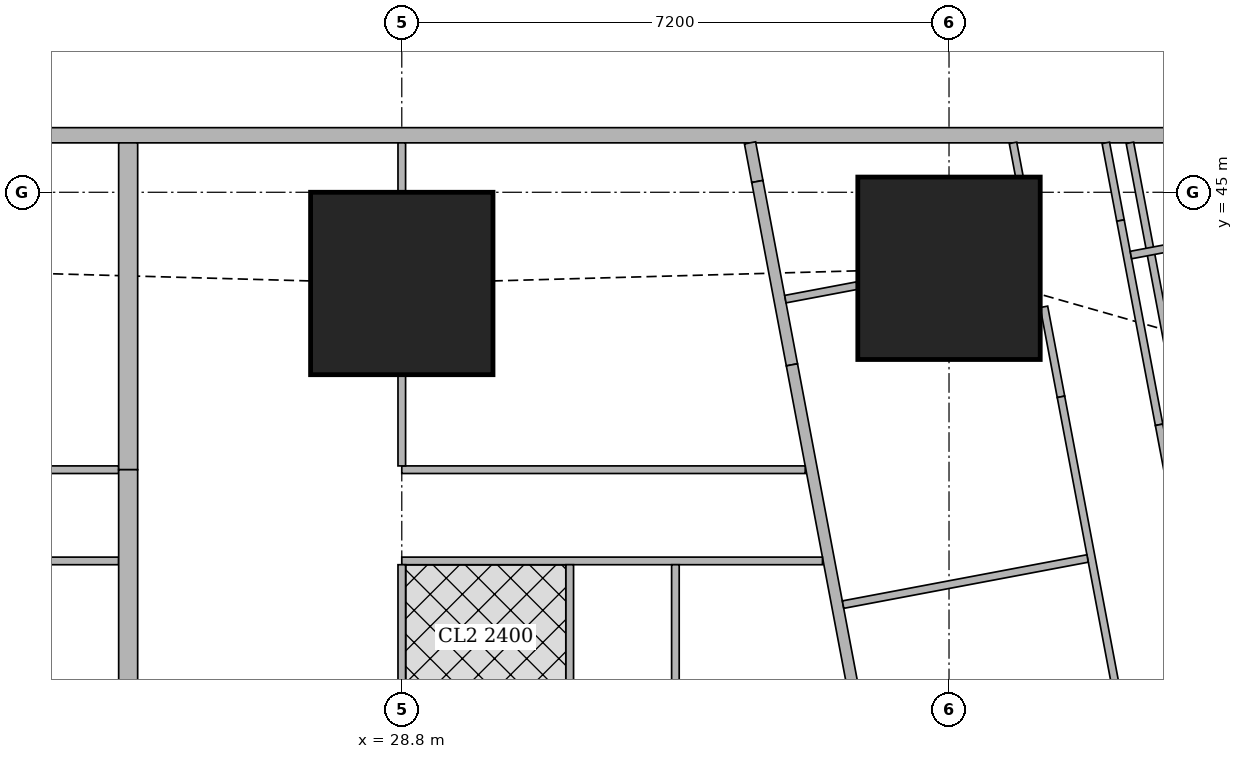
"""IFC4 building model, lengths in metres.
Left out: names, types, materials, properties, quantities, classifications, styles, units other than length and angle.
Written with IfcOpenShell. Run it as: python <this file> out.ifc"""

import sys

from ifc_helpers import new_model, si_unit, direction, frame, frame_2d, origin, origin_2d, place, context, subcontext, project, spatial, rectangle, extrude, element, fill, save


model = new_model("IFC4")
c1 = context("Model", 3, precision=1e-05, world=origin(), true_north=direction((0.0, 1.0)))
c2 = subcontext(c1, "Body", "Model", "MODEL_VIEW")
j1 = project(units=[si_unit("LENGTHUNIT", "METRE"), si_unit("PLANEANGLEUNIT", "RADIAN")], contexts=[c1])
p1 = place(None, origin())
s1 = spatial("IfcSite", under=j1, at=p1, CompositionType="ELEMENT")
p2 = place(p1, origin())
s2 = spatial("IfcBuilding", under=s1, at=p2, CompositionType="ELEMENT")
p3 = place(p2, frame((0.0, 0.0, 216.2)))
s3 = spatial("IfcBuildingStorey", under=s2, at=p3, CompositionType="ELEMENT", Elevation=216.2)
for number, where, z_axis, x_axis in (
    (1, (28.8, 43.8, 0.0), (0.0, 0.0, 1.0), (1.0, 0.0, 0.0)),
    (2, (36.0, 44.0, 0.0), (0.0, 0.0, 1.0), (1.0, 0.0, 0.0)),
):
    element("IfcColumn", number, at=place(p3, frame(where, z_axis=z_axis, x_axis=x_axis)), inside=s3, PredefinedType="COLUMN", context=c2, shape_type="SweptSolid", body=[
        extrude(rectangle(XDim=2.4, YDim=2.4, at=origin_2d()), origin(), (0.0, 0.0, 1.0), 3.75),
    ])
p4 = place(p3, frame((40.106, 45.75, 0.0), z_axis=(0.0, 0.0, 1.0), x_axis=(-1.0, 0.0, 0.0)))
e3 = element("IfcWall", 3, at=p4, inside=s3, PredefinedType="SOLIDWALL", context=c2, shape_type="SweptSolid", body=[
    extrude(rectangle(XDim=32.743, YDim=0.2, at=frame_2d((16.372, 0.0))), origin(), (0.0, 0.0, 1.0), 3.5),
])
p5 = place(p4, frame((8.606, 0.0, 0.9)))
e4 = element("IfcOpeningElement", 4, at=p5, cuts=e3, PredefinedType="OPENING", context=c2, shape_type="SweptSolid", body=[
    extrude(rectangle(XDim=1.8, YDim=1.5, at=frame_2d((0.9, 0.75))), frame((0.0, 0.11, 0.0), z_axis=(0.0, -1.0, 0.0), x_axis=(1.0, 0.0, 0.0)), (0.0, 0.0, 1.0), 0.22),
])
p6 = place(p4, frame((12.206, 0.0, 0.9)))
e5 = element("IfcOpeningElement", 5, at=p6, cuts=e3, PredefinedType="OPENING", context=c2, shape_type="SweptSolid", body=[
    extrude(rectangle(XDim=1.8, YDim=1.5, at=frame_2d((0.9, 0.75))), frame((0.0, 0.11, 0.0), z_axis=(0.0, -1.0, 0.0), x_axis=(1.0, 0.0, 0.0)), (0.0, 0.0, 1.0), 0.22),
])
p7 = place(p4, frame((15.806, 0.0, 0.9)))
e6 = element("IfcOpeningElement", 6, at=p7, cuts=e3, PredefinedType="OPENING", context=c2, shape_type="SweptSolid", body=[
    extrude(rectangle(XDim=1.8, YDim=1.5, at=frame_2d((0.9, 0.75))), frame((0.0, 0.11, 0.0), z_axis=(0.0, -1.0, 0.0), x_axis=(1.0, 0.0, 0.0)), (0.0, 0.0, 1.0), 0.22),
])
p8 = place(p4, frame((19.406, 0.0, 0.9)))
e7 = element("IfcOpeningElement", 7, at=p8, cuts=e3, PredefinedType="OPENING", context=c2, shape_type="SweptSolid", body=[
    extrude(rectangle(XDim=1.8, YDim=1.5, at=frame_2d((0.9, 0.75))), frame((0.0, 0.11, 0.0), z_axis=(0.0, -1.0, 0.0), x_axis=(1.0, 0.0, 0.0)), (0.0, 0.0, 1.0), 0.22),
])
p9 = place(p4, frame((23.006, 0.0, 0.9)))
e8 = element("IfcOpeningElement", 8, at=p9, cuts=e3, PredefinedType="OPENING", context=c2, shape_type="SweptSolid", body=[
    extrude(rectangle(XDim=1.8, YDim=1.5, at=frame_2d((0.9, 0.75))), frame((0.0, 0.11, 0.0), z_axis=(0.0, -1.0, 0.0), x_axis=(1.0, 0.0, 0.0)), (0.0, 0.0, 1.0), 0.22),
])
p10 = place(p4, frame((28.025, 0.0, 0.9)))
e9 = element("IfcOpeningElement", 9, at=p10, cuts=e3, PredefinedType="OPENING", context=c2, shape_type="SweptSolid", body=[
    extrude(rectangle(XDim=2.4, YDim=1.5, at=frame_2d((1.2, 0.75))), frame((0.0, 0.11, 0.0), z_axis=(0.0, -1.0, 0.0), x_axis=(1.0, 0.0, 0.0)), (0.0, 0.0, 1.0), 0.22),
])
p11 = place(p3, frame((33.382, 45.65, 0.0), z_axis=(0.0, 0.0, 1.0), x_axis=(0.185657456326, -0.982614527122, 0.0)))
e10 = element("IfcWall", 10, at=p11, inside=s3, PredefinedType="SOLIDWALL", context=c2, shape_type="SweptSolid", body=[
    extrude(rectangle(XDim=0.517, YDim=0.15, at=frame_2d((0.258, 0.0))), origin(), (0.0, 0.0, 1.0), 3.5),
])
p12 = place(p3, frame((33.478, 45.142, 0.0), z_axis=(0.0, 0.0, 1.0), x_axis=(0.185393362436, -0.982664388876, 0.0)))
e11 = element("IfcWall", 11, at=p12, inside=s3, PredefinedType="SOLIDWALL", context=c2, shape_type="SweptSolid", body=[
    extrude(rectangle(XDim=2.455, YDim=0.15, at=frame_2d((1.227, 0.0))), origin(), (0.0, 0.0, 1.0), 2.05),
])
p13 = place(p3, frame((33.933, 42.73, 0.0), z_axis=(0.0, 0.0, 1.0), x_axis=(0.185595417643, -0.982626246825, 0.0)))
e12 = element("IfcWall", 12, at=p13, inside=s3, PredefinedType="SOLIDWALL", context=c2, shape_type="SweptSolid", body=[
    extrude(rectangle(XDim=41.051, YDim=0.15, at=frame_2d((20.525, 0.0))), origin(), (0.0, 0.0, 1.0), 2.5),
])
p14 = place(p13, frame((12.266, 0.0, 0.0)))
e13 = element("IfcOpeningElement", 13, at=p14, cuts=e12, PredefinedType="OPENING", context=c2, shape_type="SweptSolid", body=[
    extrude(rectangle(XDim=1.0, YDim=2.1, at=frame_2d((0.5, 1.05))), frame((0.0, 0.085, 0.0), z_axis=(0.0, -1.0, 0.0), x_axis=(1.0, 0.0, 0.0)), (0.0, 0.0, 1.0), 0.17),
])
p15 = place(p13, frame((16.082, 0.0, 0.0)))
e14 = element("IfcOpeningElement", 14, at=p15, cuts=e12, PredefinedType="OPENING", context=c2, shape_type="SweptSolid", body=[
    extrude(rectangle(XDim=1.0, YDim=2.1, at=frame_2d((0.5, 1.05))), frame((0.0, 0.085, 0.0), z_axis=(0.0, -1.0, 0.0), x_axis=(1.0, 0.0, 0.0)), (0.0, 0.0, 1.0), 0.17),
])
p16 = place(p13, frame((24.369, 0.0, 0.0)))
e15 = element("IfcOpeningElement", 15, at=p16, cuts=e12, PredefinedType="OPENING", context=c2, shape_type="SweptSolid", body=[
    extrude(rectangle(XDim=1.0, YDim=2.1, at=frame_2d((0.5, 1.05))), frame((0.0, 0.085, 0.0), z_axis=(0.0, -1.0, 0.0), x_axis=(1.0, 0.0, 0.0)), (0.0, 0.0, 1.0), 0.17),
])
p17 = place(p13, frame((30.862, 0.0, 0.0)))
e16 = element("IfcOpeningElement", 16, at=p17, cuts=e12, PredefinedType="OPENING", context=c2, shape_type="SweptSolid", body=[
    extrude(rectangle(XDim=1.0, YDim=2.1, at=frame_2d((0.5, 1.05))), frame((0.0, 0.085, 0.0), z_axis=(0.0, -1.0, 0.0), x_axis=(1.0, 0.0, 0.0)), (0.0, 0.0, 1.0), 0.17),
])
p18 = place(p3, frame((39.054, 42.085, 0.0), z_axis=(0.0, 0.0, 1.0), x_axis=(-0.185791584218, 0.982589175207, 0.0)))
e17 = element("IfcWall", 17, at=p18, inside=s3, PredefinedType="PARTITIONING", context=c2, shape_type="SweptSolid", body=[
    extrude(rectangle(XDim=3.628, YDim=0.1, at=frame_2d((1.814, 0.0))), origin(), (0.0, 0.0, 1.0), 2.05),
])
p19 = place(p3, frame((38.063, 45.65, 0.0), z_axis=(0.0, 0.0, 1.0), x_axis=(0.185677287841, -0.982610779902, 0.0)))
e18 = element("IfcWall", 18, at=p19, inside=s3, PredefinedType="PARTITIONING", context=c2, shape_type="SweptSolid", body=[
    extrude(rectangle(XDim=1.04, YDim=0.1, at=frame_2d((0.52, 0.0))), origin(), (0.0, 0.0, 1.0), 3.5),
])
p20 = place(p3, frame((38.256, 44.628, 0.0), z_axis=(0.0, 0.0, 1.0), x_axis=(0.185700639943, -0.982606366927, 0.0)))
e19 = element("IfcWall", 19, at=p20, inside=s3, PredefinedType="PARTITIONING", context=c2, shape_type="SweptSolid", body=[
    extrude(rectangle(XDim=2.735, YDim=0.1, at=frame_2d((1.367, 0.0))), origin(), (0.0, 0.0, 1.0), 2.05),
])
p21 = place(p3, frame((38.764, 41.941, 0.0), z_axis=(0.0, 0.0, 1.0), x_axis=(0.185548572312, -0.982635093671, 0.0)))
e20 = element("IfcWall", 20, at=p21, inside=s3, PredefinedType="PARTITIONING", context=c2, shape_type="SweptSolid", body=[
    extrude(rectangle(XDim=9.135, YDim=0.1, at=frame_2d((4.568, 0.0))), origin(), (0.0, 0.0, 1.0), 3.5),
])
p22 = place(p21, frame((8.085, 0.0, 0.0)))
e21 = element("IfcOpeningElement", 21, at=p22, cuts=e20, PredefinedType="OPENING", context=c2, shape_type="SweptSolid", body=[
    extrude(rectangle(XDim=0.9, YDim=2.1, at=frame_2d((0.45, 1.05))), frame((0.0, 0.06, 0.0), z_axis=(0.0, -1.0, 0.0), x_axis=(1.0, 0.0, 0.0)), (0.0, 0.0, 1.0), 0.12),
])
p23 = place(p21, frame((3.7, 0.0, 0.0)))
e22 = element("IfcOpeningElement", 22, at=p23, cuts=e20, PredefinedType="OPENING", context=c2, shape_type="SweptSolid", body=[
    extrude(rectangle(XDim=0.9, YDim=2.1, at=frame_2d((0.45, 1.05))), frame((0.0, 0.06, 0.0), z_axis=(0.0, -1.0, 0.0), x_axis=(1.0, 0.0, 0.0)), (0.0, 0.0, 1.0), 0.12),
])
p24 = place(p3, frame((36.842, 45.65, 0.0), z_axis=(0.0, 0.0, 1.0), x_axis=(0.185407859198, -0.982661653748, 0.0)))
e23 = element("IfcWall", 23, at=p24, inside=s3, PredefinedType="PARTITIONING", context=c2, shape_type="SweptSolid", body=[
    extrude(rectangle(XDim=0.448, YDim=0.1, at=frame_2d((0.224, 0.0))), origin(), (0.0, 0.0, 1.0), 3.5),
])
p25 = place(p3, frame((37.249, 43.493, 0.0), z_axis=(0.0, 0.0, 1.0), x_axis=(0.185817643817, -0.982584247404, 0.0)))
e24 = element("IfcWall", 24, at=p25, inside=s3, PredefinedType="PARTITIONING", context=c2, shape_type="SweptSolid", body=[
    extrude(rectangle(XDim=1.205, YDim=0.1, at=frame_2d((0.603, 0.0))), origin(), (0.0, 0.0, 1.0), 2.05),
])
p26 = place(p3, frame((37.473, 42.309, 0.0), z_axis=(0.0, 0.0, 1.0), x_axis=(0.185491912953, -0.982645790827, 0.0)))
e25 = element("IfcWall", 25, at=p26, inside=s3, PredefinedType="PARTITIONING", context=c2, shape_type="SweptSolid", body=[
    extrude(rectangle(XDim=9.737, YDim=0.1, at=frame_2d((4.869, 0.0))), origin(), (0.0, 0.0, 1.0), 3.5),
])
p27 = place(p26, frame((8.232, 0.0, 0.0)))
e26 = element("IfcOpeningElement", 26, at=p27, cuts=e25, PredefinedType="OPENING", context=c2, shape_type="SweptSolid", body=[
    extrude(rectangle(XDim=0.9, YDim=2.1, at=frame_2d((0.45, 1.05))), frame((0.0, 0.06, 0.0), z_axis=(0.0, -1.0, 0.0), x_axis=(1.0, 0.0, 0.0)), (0.0, 0.0, 1.0), 0.12),
])
p28 = place(p26, frame((2.853, 0.0, 0.0)))
e27 = element("IfcOpeningElement", 27, at=p28, cuts=e25, PredefinedType="OPENING", context=c2, shape_type="SweptSolid", body=[
    extrude(rectangle(XDim=0.9, YDim=2.1, at=frame_2d((0.45, 1.05))), frame((0.0, 0.06, 0.0), z_axis=(0.0, -1.0, 0.0), x_axis=(1.0, 0.0, 0.0)), (0.0, 0.0, 1.0), 0.12),
])
p29 = place(p26, frame((5.564, 0.0, 0.0)))
e28 = element("IfcOpeningElement", 28, at=p29, cuts=e25, PredefinedType="OPENING", context=c2, shape_type="SweptSolid", body=[
    extrude(rectangle(XDim=0.9, YDim=2.1, at=frame_2d((0.45, 1.05))), frame((0.0, 0.06, 0.0), z_axis=(0.0, -1.0, 0.0), x_axis=(1.0, 0.0, 0.0)), (0.0, 0.0, 1.0), 0.12),
])
p30 = place(p3, frame((41.968, 44.85, 0.0), z_axis=(0.0, 0.0, 1.0), x_axis=(-0.98258614234, -0.185807623311, 0.0)))
e29 = element("IfcWall", 29, at=p30, inside=s3, PredefinedType="PARTITIONING", context=c2, shape_type="SweptSolid", body=[
    extrude(rectangle(XDim=3.638, YDim=0.1, at=frame_2d((1.819, 0.0))), origin(), (0.0, 0.0, 1.0), 2.05),
])
p31 = place(p3, frame((34.79, 43.772, 0.0), z_axis=(0.0, 0.0, 1.0), x_axis=(-0.982655532093, -0.185440301034, 0.0)))
e30 = element("IfcWall", 30, at=p31, inside=s3, PredefinedType="PARTITIONING", context=c2, shape_type="SweptSolid", body=[
    extrude(rectangle(XDim=0.96, YDim=0.1, at=frame_2d((0.48, 0.0))), origin(), (0.0, 0.0, 1.0), 2.05),
])
p32 = place(p3, frame((37.823, 40.182, 0.0), z_axis=(0.0, 0.0, 1.0), x_axis=(-0.982664729897, -0.18539155487, 0.0)))
e31 = element("IfcWall", 31, at=p32, inside=s3, PredefinedType="PARTITIONING", context=c2, shape_type="SweptSolid", body=[
    extrude(rectangle(XDim=3.274, YDim=0.1, at=frame_2d((1.637, 0.0))), origin(), (0.0, 0.0, 1.0), 3.5),
])
p33 = place(p3, frame((18.0, 41.35, 0.0), z_axis=(0.0, 0.0, 1.0), x_axis=(1.0, 0.0, 0.0)))
e32 = element("IfcWall", 32, at=p33, inside=s3, PredefinedType="PARTITIONING", context=c2, shape_type="SweptSolid", body=[
    extrude(rectangle(XDim=7.075, YDim=0.1, at=frame_2d((3.538, 0.0))), origin(), (0.0, 0.0, 1.0), 3.5),
])
p34 = place(p33, frame((0.2, 0.0, 0.0)))
e33 = element("IfcOpeningElement", 33, at=p34, cuts=e32, PredefinedType="OPENING", context=c2, shape_type="SweptSolid", body=[
    extrude(rectangle(XDim=0.9, YDim=2.1, at=frame_2d((0.45, 1.05))), frame((0.0, 0.06, 0.0), z_axis=(0.0, -1.0, 0.0), x_axis=(1.0, 0.0, 0.0)), (0.0, 0.0, 1.0), 0.12),
])
p35 = place(p33, frame((3.8, 0.0, 0.0)))
e34 = element("IfcOpeningElement", 34, at=p35, cuts=e32, PredefinedType="OPENING", context=c2, shape_type="SweptSolid", body=[
    extrude(rectangle(XDim=0.9, YDim=2.1, at=frame_2d((0.45, 1.05))), frame((0.0, 0.06, 0.0), z_axis=(0.0, -1.0, 0.0), x_axis=(1.0, 0.0, 0.0)), (0.0, 0.0, 1.0), 0.12),
])
p36 = place(p3, frame((18.0, 40.15, 0.0), z_axis=(0.0, 0.0, 1.0), x_axis=(1.0, 0.0, 0.0)))
e35 = element("IfcWall", 35, at=p36, inside=s3, PredefinedType="PARTITIONING", context=c2, shape_type="SweptSolid", body=[
    extrude(rectangle(XDim=7.075, YDim=0.1, at=frame_2d((3.538, 0.0))), origin(), (0.0, 0.0, 1.0), 3.5),
])
p37 = place(p36, frame((0.655, 0.0, 0.0)))
e36 = element("IfcOpeningElement", 36, at=p37, cuts=e35, PredefinedType="OPENING", context=c2, shape_type="SweptSolid", body=[
    extrude(rectangle(XDim=0.9, YDim=2.1, at=frame_2d((0.45, 1.05))), frame((0.0, 0.06, 0.0), z_axis=(0.0, -1.0, 0.0), x_axis=(1.0, 0.0, 0.0)), (0.0, 0.0, 1.0), 0.12),
])
p38 = place(p36, frame((3.95, 0.0, 0.0)))
e37 = element("IfcOpeningElement", 37, at=p38, cuts=e35, PredefinedType="OPENING", context=c2, shape_type="SweptSolid", body=[
    extrude(rectangle(XDim=0.9, YDim=2.1, at=frame_2d((0.45, 1.05))), frame((0.0, 0.06, 0.0), z_axis=(0.0, -1.0, 0.0), x_axis=(1.0, 0.0, 0.0)), (0.0, 0.0, 1.0), 0.12),
])
p39 = place(p36, frame((2.455, 0.0, 0.0)))
e38 = element("IfcOpeningElement", 38, at=p39, cuts=e35, PredefinedType="OPENING", context=c2, shape_type="SweptSolid", body=[
    extrude(rectangle(XDim=0.9, YDim=2.1, at=frame_2d((0.45, 1.05))), frame((0.0, 0.06, 0.0), z_axis=(0.0, -1.0, 0.0), x_axis=(1.0, 0.0, 0.0)), (0.0, 0.0, 1.0), 0.12),
])
p40 = place(p36, frame((5.75, 0.0, 0.0)))
e39 = element("IfcOpeningElement", 39, at=p40, cuts=e35, PredefinedType="OPENING", context=c2, shape_type="SweptSolid", body=[
    extrude(rectangle(XDim=0.9, YDim=2.1, at=frame_2d((0.45, 1.05))), frame((0.0, 0.06, 0.0), z_axis=(0.0, -1.0, 0.0), x_axis=(1.0, 0.0, 0.0)), (0.0, 0.0, 1.0), 0.12),
])
p41 = place(p3, frame((28.8, 41.35, 0.0), z_axis=(0.0, 0.0, 1.0), x_axis=(1.0, 0.0, 0.0)))
e40 = element("IfcWall", 40, at=p41, inside=s3, PredefinedType="PARTITIONING", context=c2, shape_type="SweptSolid", body=[
    extrude(rectangle(XDim=5.308, YDim=0.1, at=frame_2d((2.654, 0.0))), origin(), (0.0, 0.0, 1.0), 3.5),
])
p42 = place(p41, frame((1.25, 0.0, 0.0)))
e41 = element("IfcOpeningElement", 41, at=p42, cuts=e40, PredefinedType="OPENING", context=c2, shape_type="SweptSolid", body=[
    extrude(rectangle(XDim=0.9, YDim=2.1, at=frame_2d((0.45, 1.05))), frame((0.0, 0.06, 0.0), z_axis=(0.0, -1.0, 0.0), x_axis=(1.0, 0.0, 0.0)), (0.0, 0.0, 1.0), 0.12),
])
p43 = place(p3, frame((28.8, 40.15, 0.0), z_axis=(0.0, 0.0, 1.0), x_axis=(1.0, 0.0, 0.0)))
e42 = element("IfcWall", 42, at=p43, inside=s3, PredefinedType="PARTITIONING", context=c2, shape_type="SweptSolid", body=[
    extrude(rectangle(XDim=5.535, YDim=0.1, at=frame_2d((2.768, 0.0))), origin(), (0.0, 0.0, 1.0), 3.5),
])
p44 = place(p43, frame((0.655, 0.0, 0.0)))
e43 = element("IfcOpeningElement", 43, at=p44, cuts=e42, PredefinedType="OPENING", context=c2, shape_type="SweptSolid", body=[
    extrude(rectangle(XDim=0.9, YDim=2.1, at=frame_2d((0.45, 1.05))), frame((0.0, 0.06, 0.0), z_axis=(0.0, -1.0, 0.0), x_axis=(1.0, 0.0, 0.0)), (0.0, 0.0, 1.0), 0.12),
])
p45 = place(p43, frame((4.481, 0.0, 0.0)))
e44 = element("IfcOpeningElement", 44, at=p45, cuts=e42, PredefinedType="OPENING", context=c2, shape_type="SweptSolid", body=[
    extrude(rectangle(XDim=0.9, YDim=2.1, at=frame_2d((0.45, 1.05))), frame((0.0, 0.06, 0.0), z_axis=(0.0, -1.0, 0.0), x_axis=(1.0, 0.0, 0.0)), (0.0, 0.0, 1.0), 0.12),
])
p46 = place(p43, frame((2.455, 0.0, 0.0)))
e45 = element("IfcOpeningElement", 45, at=p46, cuts=e42, PredefinedType="OPENING", context=c2, shape_type="SweptSolid", body=[
    extrude(rectangle(XDim=0.9, YDim=2.1, at=frame_2d((0.45, 1.05))), frame((0.0, 0.06, 0.0), z_axis=(0.0, -1.0, 0.0), x_axis=(1.0, 0.0, 0.0)), (0.0, 0.0, 1.0), 0.12),
])
p47 = place(p3, frame((28.8, 41.4, 0.0), z_axis=(0.0, 0.0, 1.0), x_axis=(0.0, 1.0, 0.0)))
e46 = element("IfcWall", 46, at=p47, inside=s3, PredefinedType="PARTITIONING", context=c2, shape_type="SweptSolid", body=[
    extrude(rectangle(XDim=1.199, YDim=0.1, at=frame_2d((0.6, 0.0))), origin(), (0.0, 0.0, 1.0), 3.5),
])
p48 = place(p3, frame((28.8, 45.001, 0.0), z_axis=(0.0, 0.0, 1.0), x_axis=(0.0, 1.0, 0.0)))
e47 = element("IfcWall", 47, at=p48, inside=s3, PredefinedType="PARTITIONING", context=c2, shape_type="SweptSolid", body=[
    extrude(rectangle(XDim=0.649, YDim=0.1, at=frame_2d((0.324, 0.0))), origin(), (0.0, 0.0, 1.0), 3.5),
])
p49 = place(p3, frame((28.8, 38.201, 0.0), z_axis=(0.0, 0.0, 1.0), x_axis=(0.0, 1.0, 0.0)))
e48 = element("IfcWall", 48, at=p49, inside=s3, PredefinedType="PARTITIONING", context=c2, shape_type="SweptSolid", body=[
    extrude(rectangle(XDim=1.899, YDim=0.1, at=frame_2d((0.95, 0.0))), origin(), (0.0, 0.0, 1.0), 3.5),
])
for number, where, z_axis, x_axis in (
    (49, (32.4, 36.825, 0.0), (0.0, 0.0, 1.0), (0.0, 1.0, 0.0)),
    (50, (31.01, 36.825, 0.0), (0.0, 0.0, 1.0), (0.0, 1.0, 0.0)),
):
    element("IfcWall", number, at=place(p3, frame(where, z_axis=z_axis, x_axis=x_axis)), inside=s3, PredefinedType="PARTITIONING", context=c2, shape_type="SweptSolid", body=[
        extrude(rectangle(XDim=3.275, YDim=0.1, at=frame_2d((1.638, 0.0))), origin(), (0.0, 0.0, 1.0), 3.5),
    ])
p50 = place(p3, frame((25.2, 41.35, 0.0), z_axis=(0.0, 0.0, 1.0), x_axis=(0.0, 1.0, 0.0)))
e51 = element("IfcWall", 51, at=p50, inside=s3, PredefinedType="SOLIDWALL", context=c2, shape_type="SweptSolid", body=[
    extrude(rectangle(XDim=4.3, YDim=0.25, at=frame_2d((2.15, 0.0))), origin(), (0.0, 0.0, 1.0), 2.05),
])
p51 = place(p3, frame((25.2, 36.825, 0.0), z_axis=(0.0, 0.0, 1.0), x_axis=(0.0, 1.0, 0.0)))
e52 = element("IfcWall", 52, at=p51, inside=s3, PredefinedType="SOLIDWALL", context=c2, shape_type="SweptSolid", body=[
    extrude(rectangle(XDim=4.525, YDim=0.25, at=frame_2d((2.263, 0.0))), origin(), (0.0, 0.0, 1.0), 3.5),
])
p52 = place(p5, origin())
e53 = element("IfcWindow", 53, at=p52, inside=s3, PartitioningType="SINGLE_PANEL", PredefinedType="WINDOW", context=c2, shape_type="SweptSolid", body=[
    extrude(rectangle(XDim=1.8, YDim=1.5, at=frame_2d((0.9, 0.75))), frame((0.0, 0.03, 0.0), z_axis=(0.0, -1.0, 0.0), x_axis=(1.0, 0.0, 0.0)), (0.0, 0.0, 1.0), 0.06),
])
fill(e4, e53)
p53 = place(p6, origin())
e54 = element("IfcWindow", 54, at=p53, inside=s3, PartitioningType="SINGLE_PANEL", PredefinedType="WINDOW", context=c2, shape_type="SweptSolid", body=[
    extrude(rectangle(XDim=1.8, YDim=1.5, at=frame_2d((0.9, 0.75))), frame((0.0, 0.03, 0.0), z_axis=(0.0, -1.0, 0.0), x_axis=(1.0, 0.0, 0.0)), (0.0, 0.0, 1.0), 0.06),
])
fill(e5, e54)
p54 = place(p7, origin())
e55 = element("IfcWindow", 55, at=p54, inside=s3, PartitioningType="SINGLE_PANEL", PredefinedType="WINDOW", context=c2, shape_type="SweptSolid", body=[
    extrude(rectangle(XDim=1.8, YDim=1.5, at=frame_2d((0.9, 0.75))), frame((0.0, 0.03, 0.0), z_axis=(0.0, -1.0, 0.0), x_axis=(1.0, 0.0, 0.0)), (0.0, 0.0, 1.0), 0.06),
])
fill(e6, e55)
p55 = place(p28, origin())
e56 = element("IfcDoor", 56, at=p55, inside=s3, OperationType="SINGLE_SWING_LEFT", PredefinedType="DOOR", context=c2, shape_type="SweptSolid", body=[
    extrude(rectangle(XDim=0.9, YDim=2.1, at=frame_2d((0.45, 1.05))), frame((0.0, 0.025, 0.0), z_axis=(0.0, -1.0, 0.0), x_axis=(1.0, 0.0, 0.0)), (0.0, 0.0, 1.0), 0.05),
])
fill(e27, e56)
p56 = place(p40, origin())
e57 = element("IfcDoor", 57, at=p56, inside=s3, OperationType="SINGLE_SWING_LEFT", PredefinedType="DOOR", context=c2, shape_type="SweptSolid", body=[
    extrude(rectangle(XDim=0.9, YDim=2.1, at=frame_2d((0.45, 1.05))), frame((0.0, 0.025, 0.0), z_axis=(0.0, -1.0, 0.0), x_axis=(1.0, 0.0, 0.0)), (0.0, 0.0, 1.0), 0.05),
])
fill(e39, e57)
p57 = place(p42, origin())
e58 = element("IfcDoor", 58, at=p57, inside=s3, OperationType="SINGLE_SWING_RIGHT", PredefinedType="DOOR", context=c2, shape_type="SweptSolid", body=[
    extrude(rectangle(XDim=0.9, YDim=2.1, at=frame_2d((0.45, 1.05))), frame((0.0, 0.025, 0.0), z_axis=(0.0, -1.0, 0.0), x_axis=(1.0, 0.0, 0.0)), (0.0, 0.0, 1.0), 0.05),
])
fill(e41, e58)
p58 = place(p44, origin())
e59 = element("IfcDoor", 59, at=p58, inside=s3, OperationType="SINGLE_SWING_RIGHT", PredefinedType="DOOR", context=c2, shape_type="SweptSolid", body=[
    extrude(rectangle(XDim=0.9, YDim=2.1, at=frame_2d((0.45, 1.05))), frame((0.0, 0.025, 0.0), z_axis=(0.0, -1.0, 0.0), x_axis=(1.0, 0.0, 0.0)), (0.0, 0.0, 1.0), 0.05),
])
fill(e43, e59)
p59 = place(p45, origin())
e60 = element("IfcDoor", 60, at=p59, inside=s3, OperationType="SINGLE_SWING_LEFT", PredefinedType="DOOR", context=c2, shape_type="SweptSolid", body=[
    extrude(rectangle(XDim=0.9, YDim=2.1, at=frame_2d((0.45, 1.05))), frame((0.0, 0.025, 0.0), z_axis=(0.0, -1.0, 0.0), x_axis=(1.0, 0.0, 0.0)), (0.0, 0.0, 1.0), 0.05),
])
fill(e44, e60)
p60 = place(p46, origin())
e61 = element("IfcDoor", 61, at=p60, inside=s3, OperationType="SINGLE_SWING_RIGHT", PredefinedType="DOOR", context=c2, shape_type="SweptSolid", body=[
    extrude(rectangle(XDim=0.9, YDim=2.1, at=frame_2d((0.45, 1.05))), frame((0.0, 0.025, 0.0), z_axis=(0.0, -1.0, 0.0), x_axis=(1.0, 0.0, 0.0)), (0.0, 0.0, 1.0), 0.05),
])
fill(e45, e61)
save(model, sys.argv[1])
